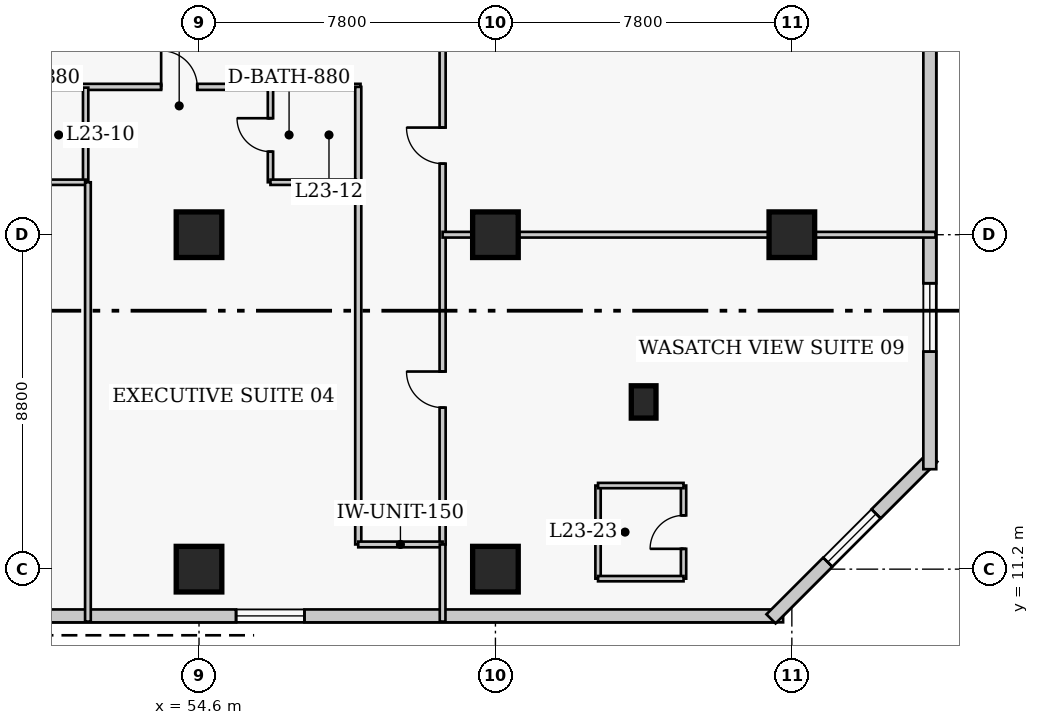
"""IFC4 building model, lengths in metres.
Left out: names, types, materials, properties, quantities, classifications, styles, units other than length and angle.
Written with IfcOpenShell. Run it as: python <this file> out.ifc"""

import sys

from ifc_helpers import new_model, si_unit, direction, frame, frame_2d, origin, origin_2d, place, context, subcontext, project, spatial, rectangle, extrude, element, fill, save


model = new_model("IFC4")
c1 = context("Model", 3, precision=1e-05, world=origin(), true_north=direction((0.0, 1.0)))
c2 = subcontext(c1, "Body", "Model", "MODEL_VIEW")
j1 = project(units=[si_unit("LENGTHUNIT", "METRE"), si_unit("PLANEANGLEUNIT", "RADIAN")], contexts=[c1])
p1 = place(None, origin())
s1 = spatial("IfcSite", under=j1, at=p1, CompositionType="ELEMENT")
p2 = place(p1, origin())
s2 = spatial("IfcBuilding", under=s1, at=p2, CompositionType="ELEMENT")
p3 = place(p2, frame((0.0, 0.0, 95.6)))
s3 = spatial("IfcBuildingStorey", under=s2, at=p3, CompositionType="ELEMENT", Elevation=95.6)
for number, where, z_axis, x_axis in (
    (1, (54.6, 11.2, 0.0), (0.0, 0.0, 1.0), (1.0, 0.0, 0.0)),
    (2, (54.6, 20.0, 0.0), (0.0, 0.0, 1.0), (1.0, 0.0, 0.0)),
    (3, (62.4, 11.2, 0.0), (0.0, 0.0, 1.0), (1.0, 0.0, 0.0)),
    (4, (62.4, 20.0, 0.0), (0.0, 0.0, 1.0), (1.0, 0.0, 0.0)),
    (5, (70.2, 20.0, 0.0), (0.0, 0.0, 1.0), (1.0, 0.0, 0.0)),
):
    element("IfcColumn", number, at=place(p3, frame(where, z_axis=z_axis, x_axis=x_axis)), inside=s3, PredefinedType="COLUMN", context=c2, shape_type="SweptSolid", body=[
        extrude(rectangle(XDim=1.2, YDim=1.2, at=origin_2d()), origin(), (0.0, 0.0, 1.0), 3.8),
    ])
p4 = place(p3, frame((66.3, 15.6, 0.0), z_axis=(0.0, 0.0, 1.0), x_axis=(1.0, 0.0, 0.0)))
e6 = element("IfcColumn", 6, at=p4, inside=s3, PredefinedType="PILASTER", context=c2, shape_type="SweptSolid", body=[
    extrude(rectangle(XDim=0.65, YDim=0.85, at=origin_2d()), origin(), (0.0, 0.0, 1.0), 3.8),
])
p5 = place(p3, frame((41.68, 9.97, 0.0), z_axis=(0.0, 0.0, 1.0), x_axis=(1.0, 0.0, 0.0)))
e7 = element("IfcWall", 7, at=p5, inside=s3, PredefinedType="SOLIDWALL", context=c2, shape_type="SweptSolid", body=[
    extrude(rectangle(XDim=28.29, YDim=0.34, at=frame_2d((14.145, 0.0))), origin(), (0.0, 0.0, 1.0), 3.54),
])
p6 = place(p5, frame((2.665, 0.0, 0.85)))
e8 = element("IfcOpeningElement", 8, at=p6, cuts=e7, PredefinedType="OPENING", context=c2, shape_type="SweptSolid", body=[
    extrude(rectangle(XDim=1.8, YDim=1.8, at=frame_2d((0.9, 0.9))), frame((0.0, 0.18, 0.0), z_axis=(0.0, -1.0, 0.0), x_axis=(1.0, 0.0, 0.0)), (0.0, 0.0, 1.0), 0.36),
])
p7 = place(p5, frame((13.895, 0.0, 0.85)))
e9 = element("IfcOpeningElement", 9, at=p7, cuts=e7, PredefinedType="OPENING", context=c2, shape_type="SweptSolid", body=[
    extrude(rectangle(XDim=1.8, YDim=1.8, at=frame_2d((0.9, 0.9))), frame((0.0, 0.18, 0.0), z_axis=(0.0, -1.0, 0.0), x_axis=(1.0, 0.0, 0.0)), (0.0, 0.0, 1.0), 0.36),
])
p8 = place(p3, frame((69.652, 9.892, 0.0), z_axis=(0.0, 0.0, 1.0), x_axis=(0.707106781187, 0.707106781187, 0.0)))
e10 = element("IfcWall", 10, at=p8, inside=s3, PredefinedType="SOLIDWALL", context=c2, shape_type="SweptSolid", body=[
    extrude(rectangle(XDim=6.02, YDim=0.34, at=frame_2d((3.01, 0.0))), origin(), (0.0, 0.0, 1.0), 3.54),
])
p9 = place(p8, frame((2.11, 0.0, 0.85)))
e11 = element("IfcOpeningElement", 11, at=p9, cuts=e10, PredefinedType="OPENING", context=c2, shape_type="SweptSolid", body=[
    extrude(rectangle(XDim=1.8, YDim=1.8, at=frame_2d((0.9, 0.9))), frame((0.0, 0.18, 0.0), z_axis=(0.0, -1.0, 0.0), x_axis=(1.0, 0.0, 0.0)), (0.0, 0.0, 1.0), 0.36),
])
p10 = place(p3, frame((73.83, 13.83, 0.0), z_axis=(0.0, 0.0, 1.0), x_axis=(0.0, 1.0, 0.0)))
e12 = element("IfcWall", 12, at=p10, inside=s3, PredefinedType="SOLIDWALL", context=c2, shape_type="SweptSolid", body=[
    extrude(rectangle(XDim=31.94, YDim=0.34, at=frame_2d((15.97, 0.0))), origin(), (0.0, 0.0, 1.0), 3.54),
])
p11 = place(p10, frame((3.093, 0.0, 0.85)))
e13 = element("IfcOpeningElement", 13, at=p11, cuts=e12, PredefinedType="OPENING", context=c2, shape_type="SweptSolid", body=[
    extrude(rectangle(XDim=1.8, YDim=1.8, at=frame_2d((0.9, 0.9))), frame((0.0, 0.18, 0.0), z_axis=(0.0, -1.0, 0.0), x_axis=(1.0, 0.0, 0.0)), (0.0, 0.0, 1.0), 0.36),
])
p12 = place(p10, frame((11.077, 0.0, 0.85)))
e14 = element("IfcOpeningElement", 14, at=p12, cuts=e12, PredefinedType="OPENING", context=c2, shape_type="SweptSolid", body=[
    extrude(rectangle(XDim=1.8, YDim=1.8, at=frame_2d((0.9, 0.9))), frame((0.0, 0.18, 0.0), z_axis=(0.0, -1.0, 0.0), x_axis=(1.0, 0.0, 0.0)), (0.0, 0.0, 1.0), 0.36),
])
p13 = place(p10, frame((19.062, 0.0, 0.85)))
e15 = element("IfcOpeningElement", 15, at=p13, cuts=e12, PredefinedType="OPENING", context=c2, shape_type="SweptSolid", body=[
    extrude(rectangle(XDim=1.8, YDim=1.8, at=frame_2d((0.9, 0.9))), frame((0.0, 0.18, 0.0), z_axis=(0.0, -1.0, 0.0), x_axis=(1.0, 0.0, 0.0)), (0.0, 0.0, 1.0), 0.36),
])
p14 = place(p10, frame((27.048, 0.0, 0.85)))
e16 = element("IfcOpeningElement", 16, at=p14, cuts=e12, PredefinedType="OPENING", context=c2, shape_type="SweptSolid", body=[
    extrude(rectangle(XDim=1.8, YDim=1.8, at=frame_2d((0.9, 0.9))), frame((0.0, 0.18, 0.0), z_axis=(0.0, -1.0, 0.0), x_axis=(1.0, 0.0, 0.0)), (0.0, 0.0, 1.0), 0.36),
])
p15 = place(p3, frame((35.8, 23.89, 0.0), z_axis=(0.0, 0.0, 1.0), x_axis=(1.0, 0.0, 0.0)))
e17 = element("IfcWall", 17, at=p15, inside=s3, PredefinedType="PARTITIONING", context=c2, shape_type="SweptSolid", body=[
    extrude(rectangle(XDim=23.05, YDim=0.16, at=frame_2d((11.525, 0.0))), origin(), (0.0, 0.0, 1.0), 3.54),
])
p16 = place(p15, frame((3.607, 0.0, 0.0)))
e18 = element("IfcOpeningElement", 18, at=p16, cuts=e17, PredefinedType="OPENING", context=c2, shape_type="SweptSolid", body=[
    extrude(rectangle(XDim=1.0, YDim=2.15, at=frame_2d((0.5, 1.075))), frame((0.0, 0.09, 0.0), z_axis=(0.0, -1.0, 0.0), x_axis=(1.0, 0.0, 0.0)), (0.0, 0.0, 1.0), 0.18),
])
p17 = place(p15, frame((10.415, 0.0, 0.0)))
e19 = element("IfcOpeningElement", 19, at=p17, cuts=e17, PredefinedType="OPENING", context=c2, shape_type="SweptSolid", body=[
    extrude(rectangle(XDim=0.95, YDim=2.1, at=frame_2d((0.475, 1.05))), frame((0.0, 0.09, 0.0), z_axis=(0.0, -1.0, 0.0), x_axis=(1.0, 0.0, 0.0)), (0.0, 0.0, 1.0), 0.18),
])
p18 = place(p15, frame((17.803, 0.0, 0.0)))
e20 = element("IfcOpeningElement", 20, at=p18, cuts=e17, PredefinedType="OPENING", context=c2, shape_type="SweptSolid", body=[
    extrude(rectangle(XDim=0.95, YDim=2.1, at=frame_2d((0.475, 1.05))), frame((0.0, 0.09, 0.0), z_axis=(0.0, -1.0, 0.0), x_axis=(1.0, 0.0, 0.0)), (0.0, 0.0, 1.0), 0.18),
])
p19 = place(p3, frame((61.01, 11.85, 0.0), z_axis=(0.0, 0.0, 1.0), x_axis=(0.0, 1.0, 0.0)))
e21 = element("IfcWall", 21, at=p19, inside=s3, PredefinedType="PARTITIONING", context=c2, shape_type="SweptSolid", body=[
    extrude(rectangle(XDim=28.8, YDim=0.16, at=frame_2d((14.4, 0.0))), origin(), (0.0, 0.0, 1.0), 3.54),
])
p20 = place(p19, frame((3.6, 0.0, 0.0)))
e22 = element("IfcOpeningElement", 22, at=p20, cuts=e21, PredefinedType="OPENING", context=c2, shape_type="SweptSolid", body=[
    extrude(rectangle(XDim=0.95, YDim=2.1, at=frame_2d((0.475, 1.05))), frame((0.0, 0.09, 0.0), z_axis=(0.0, -1.0, 0.0), x_axis=(1.0, 0.0, 0.0)), (0.0, 0.0, 1.0), 0.18),
])
p21 = place(p19, frame((10.019, 0.0, 0.0)))
e23 = element("IfcOpeningElement", 23, at=p21, cuts=e21, PredefinedType="OPENING", context=c2, shape_type="SweptSolid", body=[
    extrude(rectangle(XDim=0.95, YDim=2.1, at=frame_2d((0.475, 1.05))), frame((0.0, 0.09, 0.0), z_axis=(0.0, -1.0, 0.0), x_axis=(1.0, 0.0, 0.0)), (0.0, 0.0, 1.0), 0.18),
])
p22 = place(p19, frame((27.36, 0.0, 0.0)))
e24 = element("IfcOpeningElement", 24, at=p22, cuts=e21, PredefinedType="OPENING", context=c2, shape_type="SweptSolid", body=[
    extrude(rectangle(XDim=1.0, YDim=2.15, at=frame_2d((0.5, 1.075))), frame((0.0, 0.09, 0.0), z_axis=(0.0, -1.0, 0.0), x_axis=(1.0, 0.0, 0.0)), (0.0, 0.0, 1.0), 0.18),
])
p23 = place(p3, frame((58.79, 11.85, 0.0), z_axis=(0.0, 0.0, 1.0), x_axis=(0.0, 1.0, 0.0)))
e25 = element("IfcWall", 25, at=p23, inside=s3, PredefinedType="PARTITIONING", context=c2, shape_type="SweptSolid", body=[
    extrude(rectangle(XDim=12.04, YDim=0.16, at=frame_2d((6.02, 0.0))), origin(), (0.0, 0.0, 1.0), 3.54),
])
p24 = place(p3, frame((58.79, 11.85, 0.0), z_axis=(0.0, 0.0, 1.0), x_axis=(1.0, 0.0, 0.0)))
e26 = element("IfcWall", 26, at=p24, inside=s3, PredefinedType="PARTITIONING", context=c2, shape_type="SweptSolid", body=[
    extrude(rectangle(XDim=2.22, YDim=0.15, at=frame_2d((1.11, 0.0))), origin(), (0.0, 0.0, 1.0), 3.54),
])
p25 = place(p3, frame((51.617, 21.38, 0.0), z_axis=(0.0, 0.0, 1.0), x_axis=(0.0, 1.0, 0.0)))
e27 = element("IfcWall", 27, at=p25, inside=s3, PredefinedType="PLUMBINGWALL", context=c2, shape_type="SweptSolid", body=[
    extrude(rectangle(XDim=2.49, YDim=0.14, at=frame_2d((1.245, 0.0))), origin(), (0.0, 0.0, 1.0), 3.54),
])
p26 = place(p3, frame((49.367, 21.38, 0.0), z_axis=(0.0, 0.0, 1.0), x_axis=(1.0, 0.0, 0.0)))
e28 = element("IfcWall", 28, at=p26, inside=s3, PredefinedType="PLUMBINGWALL", context=c2, shape_type="SweptSolid", body=[
    extrude(rectangle(XDim=2.25, YDim=0.14, at=frame_2d((1.125, 0.0))), origin(), (0.0, 0.0, 1.0), 3.54),
])
p27 = place(p3, frame((51.677, 9.82, 0.0), z_axis=(0.0, 0.0, 1.0), x_axis=(0.0, 1.0, 0.0)))
e29 = element("IfcWall", 29, at=p27, inside=s3, PredefinedType="PARTITIONING", context=c2, shape_type="SweptSolid", body=[
    extrude(rectangle(XDim=11.56, YDim=0.15, at=frame_2d((5.78, 0.0))), origin(), (0.0, 0.0, 1.0), 3.54),
])
p28 = place(p3, frame((56.48, 21.38, 0.0), z_axis=(0.0, 0.0, 1.0), x_axis=(0.0, 1.0, 0.0)))
e30 = element("IfcWall", 30, at=p28, inside=s3, PredefinedType="PLUMBINGWALL", context=c2, shape_type="SweptSolid", body=[
    extrude(rectangle(XDim=2.49, YDim=0.14, at=frame_2d((1.245, 0.0))), origin(), (0.0, 0.0, 1.0), 3.54),
])
p29 = place(p28, frame((0.805, 0.0, 0.0)))
e31 = element("IfcOpeningElement", 31, at=p29, cuts=e30, PredefinedType="OPENING", context=c2, shape_type="SweptSolid", body=[
    extrude(rectangle(XDim=0.88, YDim=2.05, at=frame_2d((0.44, 1.025))), frame((0.0, 0.08, 0.0), z_axis=(0.0, -1.0, 0.0), x_axis=(1.0, 0.0, 0.0)), (0.0, 0.0, 1.0), 0.16),
])
p30 = place(p3, frame((56.48, 21.38, 0.0), z_axis=(0.0, 0.0, 1.0), x_axis=(1.0, 0.0, 0.0)))
e32 = element("IfcWall", 32, at=p30, inside=s3, PredefinedType="PLUMBINGWALL", context=c2, shape_type="SweptSolid", body=[
    extrude(rectangle(XDim=2.25, YDim=0.14, at=frame_2d((1.125, 0.0))), origin(), (0.0, 0.0, 1.0), 3.54),
])
p31 = place(p3, frame((61.01, 9.82, 0.0), z_axis=(0.0, 0.0, 1.0), x_axis=(0.0, 1.0, 0.0)))
e33 = element("IfcWall", 33, at=p31, inside=s3, PredefinedType="PARTITIONING", context=c2, shape_type="SweptSolid", body=[
    extrude(rectangle(XDim=2.03, YDim=0.15, at=frame_2d((1.015, 0.0))), origin(), (0.0, 0.0, 1.0), 3.54),
])
p32 = place(p3, frame((65.1, 10.95, 0.0), z_axis=(0.0, 0.0, 1.0), x_axis=(0.0, 1.0, 0.0)))
e34 = element("IfcWall", 34, at=p32, inside=s3, PredefinedType="PLUMBINGWALL", context=c2, shape_type="SweptSolid", body=[
    extrude(rectangle(XDim=2.45, YDim=0.14, at=frame_2d((1.225, 0.0))), origin(), (0.0, 0.0, 1.0), 3.54),
])
p33 = place(p3, frame((67.35, 10.95, 0.0), z_axis=(0.0, 0.0, 1.0), x_axis=(0.0, 1.0, 0.0)))
e35 = element("IfcWall", 35, at=p33, inside=s3, PredefinedType="PLUMBINGWALL", context=c2, shape_type="SweptSolid", body=[
    extrude(rectangle(XDim=2.45, YDim=0.14, at=frame_2d((1.225, 0.0))), origin(), (0.0, 0.0, 1.0), 3.54),
])
p34 = place(p33, frame((0.785, 0.0, 0.0)))
e36 = element("IfcOpeningElement", 36, at=p34, cuts=e35, PredefinedType="OPENING", context=c2, shape_type="SweptSolid", body=[
    extrude(rectangle(XDim=0.88, YDim=2.05, at=frame_2d((0.44, 1.025))), frame((0.0, 0.08, 0.0), z_axis=(0.0, -1.0, 0.0), x_axis=(1.0, 0.0, 0.0)), (0.0, 0.0, 1.0), 0.16),
])
for number, where, z_axis, x_axis in (
    (37, (65.1, 10.95, 0.0), (0.0, 0.0, 1.0), (1.0, 0.0, 0.0)),
    (38, (65.1, 13.4, 0.0), (0.0, 0.0, 1.0), (1.0, 0.0, 0.0)),
):
    element("IfcWall", number, at=place(p3, frame(where, z_axis=z_axis, x_axis=x_axis)), inside=s3, PredefinedType="PLUMBINGWALL", context=c2, shape_type="SweptSolid", body=[
        extrude(rectangle(XDim=2.25, YDim=0.14, at=frame_2d((1.125, 0.0))), origin(), (0.0, 0.0, 1.0), 3.54),
    ])
p35 = place(p3, frame((61.01, 20.0, 0.0), z_axis=(0.0, 0.0, 1.0), x_axis=(1.0, 0.0, 0.0)))
e39 = element("IfcWall", 39, at=p35, inside=s3, PredefinedType="PARTITIONING", context=c2, shape_type="SweptSolid", body=[
    extrude(rectangle(XDim=12.97, YDim=0.15, at=frame_2d((6.485, 0.0))), origin(), (0.0, 0.0, 1.0), 2.679),
])
p36 = place(p7, origin())
e40 = element("IfcWindow", 40, at=p36, inside=s3, PartitioningType="SINGLE_PANEL", PredefinedType="WINDOW", context=c2, shape_type="SweptSolid", body=[
    extrude(rectangle(XDim=1.8, YDim=1.8, at=frame_2d((0.9, 0.9))), frame((0.0, 0.03, 0.0), z_axis=(0.0, -1.0, 0.0), x_axis=(1.0, 0.0, 0.0)), (0.0, 0.0, 1.0), 0.06),
])
fill(e9, e40)
p37 = place(p9, origin())
e41 = element("IfcWindow", 41, at=p37, inside=s3, PartitioningType="SINGLE_PANEL", PredefinedType="WINDOW", context=c2, shape_type="SweptSolid", body=[
    extrude(rectangle(XDim=1.8, YDim=1.8, at=frame_2d((0.9, 0.9))), frame((0.0, 0.03, 0.0), z_axis=(0.0, -1.0, 0.0), x_axis=(1.0, 0.0, 0.0)), (0.0, 0.0, 1.0), 0.06),
])
fill(e11, e41)
p38 = place(p11, origin())
e42 = element("IfcWindow", 42, at=p38, inside=s3, PartitioningType="SINGLE_PANEL", PredefinedType="WINDOW", context=c2, shape_type="SweptSolid", body=[
    extrude(rectangle(XDim=1.8, YDim=1.8, at=frame_2d((0.9, 0.9))), frame((0.0, 0.03, 0.0), z_axis=(0.0, -1.0, 0.0), x_axis=(1.0, 0.0, 0.0)), (0.0, 0.0, 1.0), 0.06),
])
fill(e13, e42)
p39 = place(p29, origin())
e43 = element("IfcDoor", 43, at=p39, inside=s3, OperationType="SINGLE_SWING_RIGHT", PredefinedType="DOOR", context=c2, shape_type="SweptSolid", body=[
    extrude(rectangle(XDim=0.88, YDim=2.05, at=frame_2d((0.44, 1.025))), frame((0.0, 0.025, 0.0), z_axis=(0.0, -1.0, 0.0), x_axis=(1.0, 0.0, 0.0)), (0.0, 0.0, 1.0), 0.05),
])
fill(e31, e43)
p40 = place(p18, origin())
e44 = element("IfcDoor", 44, at=p40, inside=s3, OperationType="SINGLE_SWING_LEFT", PredefinedType="DOOR", context=c2, shape_type="SweptSolid", body=[
    extrude(rectangle(XDim=0.95, YDim=2.1, at=frame_2d((0.475, 1.05))), frame((0.0, 0.025, 0.0), z_axis=(0.0, -1.0, 0.0), x_axis=(1.0, 0.0, 0.0)), (0.0, 0.0, 1.0), 0.05),
])
fill(e20, e44)
p41 = place(p34, origin())
e45 = element("IfcDoor", 45, at=p41, inside=s3, OperationType="SINGLE_SWING_LEFT", PredefinedType="DOOR", context=c2, shape_type="SweptSolid", body=[
    extrude(rectangle(XDim=0.88, YDim=2.05, at=frame_2d((0.44, 1.025))), frame((0.0, 0.025, 0.0), z_axis=(0.0, -1.0, 0.0), x_axis=(1.0, 0.0, 0.0)), (0.0, 0.0, 1.0), 0.05),
])
fill(e36, e45)
p42 = place(p20, origin())
e46 = element("IfcDoor", 46, at=p42, inside=s3, OperationType="SINGLE_SWING_RIGHT", PredefinedType="DOOR", context=c2, shape_type="SweptSolid", body=[
    extrude(rectangle(XDim=0.95, YDim=2.1, at=frame_2d((0.475, 1.05))), frame((0.0, 0.025, 0.0), z_axis=(0.0, -1.0, 0.0), x_axis=(1.0, 0.0, 0.0)), (0.0, 0.0, 1.0), 0.05),
])
fill(e22, e46)
p43 = place(p21, origin())
e47 = element("IfcDoor", 47, at=p43, inside=s3, OperationType="SINGLE_SWING_RIGHT", PredefinedType="DOOR", context=c2, shape_type="SweptSolid", body=[
    extrude(rectangle(XDim=0.95, YDim=2.1, at=frame_2d((0.475, 1.05))), frame((0.0, 0.025, 0.0), z_axis=(0.0, -1.0, 0.0), x_axis=(1.0, 0.0, 0.0)), (0.0, 0.0, 1.0), 0.05),
])
fill(e23, e47)
save(model, sys.argv[1])
